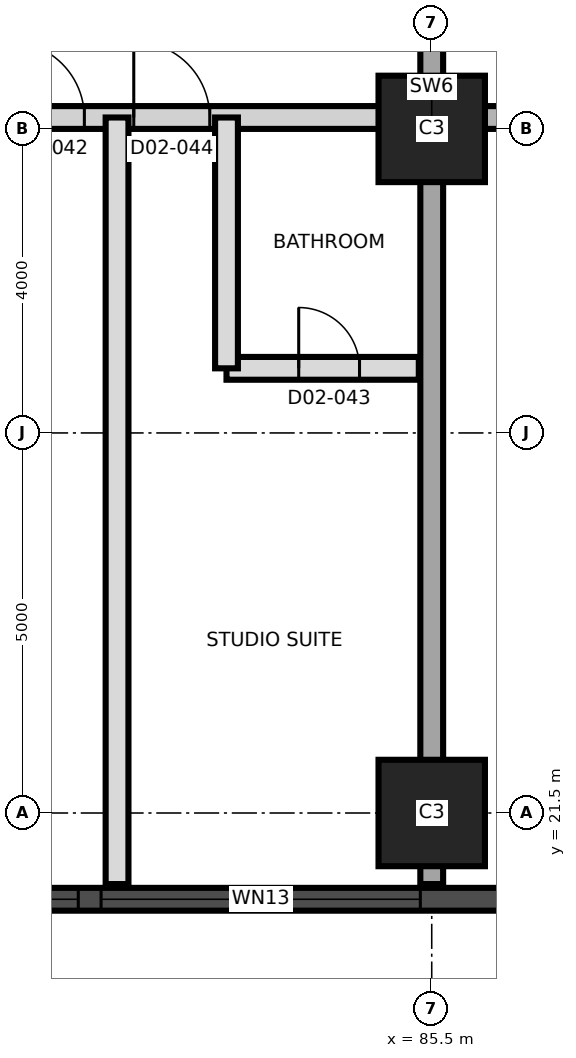
"""IFC4 building model, lengths in metres.
Left out: names, types, materials, properties, quantities, classifications, styles, units other than length and angle.
Written with IfcOpenShell. Run it as: python <this file> out.ifc"""

import sys

from ifc_helpers import new_model, si_unit, direction, frame, frame_2d, origin, origin_2d, place, context, subcontext, project, spatial, rectangle, extrude, element, fill, save


model = new_model("IFC4")
c1 = context("Model", 3, precision=1e-05, world=origin(), true_north=direction((0.0, 1.0)))
c2 = subcontext(c1, "Body", "Model", "MODEL_VIEW")
j1 = project(units=[si_unit("LENGTHUNIT", "METRE"), si_unit("PLANEANGLEUNIT", "RADIAN")], contexts=[c1])
p1 = place(None, origin())
s1 = spatial("IfcSite", under=j1, at=p1, CompositionType="ELEMENT")
p2 = place(p1, origin())
s2 = spatial("IfcBuilding", under=s1, at=p2, CompositionType="ELEMENT")
p3 = place(p2, frame((0.0, 0.0, 48.3)))
s3 = spatial("IfcBuildingStorey", under=s2, at=p3, CompositionType="ELEMENT", Elevation=48.3)
for number, where, z_axis, x_axis in (
    (1, (85.5, 21.5, 0.0), (0.0, 0.0, 1.0), (1.0, 0.0, 0.0)),
    (2, (85.5, 30.5, 0.0), (0.0, 0.0, 1.0), (1.0, 0.0, 0.0)),
):
    element("IfcColumn", number, at=place(p3, frame(where, z_axis=z_axis, x_axis=x_axis)), inside=s3, PredefinedType="COLUMN", context=c2, shape_type="SweptSolid", body=[
        extrude(rectangle(XDim=1.4, YDim=1.4, at=origin_2d()), origin(), (0.0, 0.0, 1.0), 3.7),
    ])
p4 = place(p3, frame((85.5, 20.565, 0.0), z_axis=(0.0, 0.0, 1.0), x_axis=(0.0, 1.0, 0.0)))
e3 = element("IfcWall", 3, at=p4, inside=s3, PredefinedType="SHEAR", context=c2, shape_type="SweptSolid", body=[
    extrude(rectangle(XDim=19.87, YDim=0.3, at=frame_2d((9.935, 0.0))), origin(), (0.0, 0.0, 1.0), 3.7),
])
p5 = place(p4, frame((11.135, 0.0, 0.0)))
e4 = element("IfcOpeningElement", 4, at=p5, cuts=e3, PredefinedType="OPENING", context=c2, shape_type="SweptSolid", body=[
    extrude(rectangle(XDim=1.4, YDim=2.1, at=frame_2d((0.7, 1.05))), frame((0.0, 0.16, 0.0), z_axis=(0.0, -1.0, 0.0), x_axis=(1.0, 0.0, 0.0)), (0.0, 0.0, 1.0), 0.32),
])
p6 = place(p3, frame((44.021, 20.365, 0.0), z_axis=(0.0, 0.0, 1.0), x_axis=(1.0, 0.0, 0.0)))
e5 = element("IfcWall", 5, at=p6, inside=s3, PredefinedType="SOLIDWALL", context=c2, shape_type="SweptSolid", body=[
    extrude(rectangle(XDim=43.466, YDim=0.3, at=frame_2d((21.733, 0.0))), origin(), (0.0, 0.0, 1.0), 3.4),
])
p7 = place(p6, frame((1.84, 0.0, 0.3)))
e6 = element("IfcOpeningElement", 6, at=p7, cuts=e5, PredefinedType="OPENING", context=c2, shape_type="SweptSolid", body=[
    extrude(rectangle(XDim=1.8, YDim=2.4, at=frame_2d((0.9, 1.2))), frame((0.0, 0.16, 0.0), z_axis=(0.0, -1.0, 0.0), x_axis=(1.0, 0.0, 0.0)), (0.0, 0.0, 1.0), 0.32),
])
p8 = place(p6, frame((5.63, 0.0, 0.9)))
e7 = element("IfcOpeningElement", 7, at=p8, cuts=e5, PredefinedType="OPENING", context=c2, shape_type="SweptSolid", body=[
    extrude(rectangle(XDim=4.2, YDim=1.7, at=frame_2d((2.1, 0.85))), frame((0.0, 0.16, 0.0), z_axis=(0.0, -1.0, 0.0), x_axis=(1.0, 0.0, 0.0)), (0.0, 0.0, 1.0), 0.32),
])
p9 = place(p6, frame((10.13, 0.0, 0.9)))
e8 = element("IfcOpeningElement", 8, at=p9, cuts=e5, PredefinedType="OPENING", context=c2, shape_type="SweptSolid", body=[
    extrude(rectangle(XDim=4.2, YDim=1.7, at=frame_2d((2.1, 0.85))), frame((0.0, 0.16, 0.0), z_axis=(0.0, -1.0, 0.0), x_axis=(1.0, 0.0, 0.0)), (0.0, 0.0, 1.0), 0.32),
])
p10 = place(p6, frame((14.63, 0.0, 0.9)))
e9 = element("IfcOpeningElement", 9, at=p10, cuts=e5, PredefinedType="OPENING", context=c2, shape_type="SweptSolid", body=[
    extrude(rectangle(XDim=4.2, YDim=1.7, at=frame_2d((2.1, 0.85))), frame((0.0, 0.16, 0.0), z_axis=(0.0, -1.0, 0.0), x_axis=(1.0, 0.0, 0.0)), (0.0, 0.0, 1.0), 0.32),
])
p11 = place(p6, frame((19.13, 0.0, 0.9)))
e10 = element("IfcOpeningElement", 10, at=p11, cuts=e5, PredefinedType="OPENING", context=c2, shape_type="SweptSolid", body=[
    extrude(rectangle(XDim=4.2, YDim=1.7, at=frame_2d((2.1, 0.85))), frame((0.0, 0.16, 0.0), z_axis=(0.0, -1.0, 0.0), x_axis=(1.0, 0.0, 0.0)), (0.0, 0.0, 1.0), 0.32),
])
p12 = place(p6, frame((23.63, 0.0, 0.9)))
e11 = element("IfcOpeningElement", 11, at=p12, cuts=e5, PredefinedType="OPENING", context=c2, shape_type="SweptSolid", body=[
    extrude(rectangle(XDim=4.2, YDim=1.7, at=frame_2d((2.1, 0.85))), frame((0.0, 0.16, 0.0), z_axis=(0.0, -1.0, 0.0), x_axis=(1.0, 0.0, 0.0)), (0.0, 0.0, 1.0), 0.32),
])
p13 = place(p6, frame((28.13, 0.0, 0.9)))
e12 = element("IfcOpeningElement", 12, at=p13, cuts=e5, PredefinedType="OPENING", context=c2, shape_type="SweptSolid", body=[
    extrude(rectangle(XDim=4.2, YDim=1.7, at=frame_2d((2.1, 0.85))), frame((0.0, 0.16, 0.0), z_axis=(0.0, -1.0, 0.0), x_axis=(1.0, 0.0, 0.0)), (0.0, 0.0, 1.0), 0.32),
])
p14 = place(p6, frame((32.63, 0.0, 0.9)))
e13 = element("IfcOpeningElement", 13, at=p14, cuts=e5, PredefinedType="OPENING", context=c2, shape_type="SweptSolid", body=[
    extrude(rectangle(XDim=4.2, YDim=1.7, at=frame_2d((2.1, 0.85))), frame((0.0, 0.16, 0.0), z_axis=(0.0, -1.0, 0.0), x_axis=(1.0, 0.0, 0.0)), (0.0, 0.0, 1.0), 0.32),
])
p15 = place(p6, frame((37.13, 0.0, 0.9)))
e14 = element("IfcOpeningElement", 14, at=p15, cuts=e5, PredefinedType="OPENING", context=c2, shape_type="SweptSolid", body=[
    extrude(rectangle(XDim=4.2, YDim=1.7, at=frame_2d((2.1, 0.85))), frame((0.0, 0.16, 0.0), z_axis=(0.0, -1.0, 0.0), x_axis=(1.0, 0.0, 0.0)), (0.0, 0.0, 1.0), 0.32),
])
p16 = place(p3, frame((82.8, 27.35, 0.0), z_axis=(0.0, 0.0, 1.0), x_axis=(1.0, 0.0, 0.0)))
e15 = element("IfcWall", 15, at=p16, inside=s3, PredefinedType="PARTITIONING", context=c2, shape_type="SweptSolid", body=[
    extrude(rectangle(XDim=2.53, YDim=0.3, at=frame_2d((1.265, 0.0))), origin(), (0.0, 0.0, 1.0), 3.4),
])
p17 = place(p16, frame((0.95, 0.0, 0.0)))
e16 = element("IfcOpeningElement", 16, at=p17, cuts=e15, PredefinedType="OPENING", context=c2, shape_type="SweptSolid", body=[
    extrude(rectangle(XDim=0.8, YDim=2.1, at=frame_2d((0.4, 1.05))), frame((0.0, 0.16, 0.0), z_axis=(0.0, -1.0, 0.0), x_axis=(1.0, 0.0, 0.0)), (0.0, 0.0, 1.0), 0.32),
])
p18 = place(p3, frame((58.95, 30.65, 0.0), z_axis=(0.0, 0.0, 1.0), x_axis=(1.0, 0.0, 0.0)))
e17 = element("IfcWall", 17, at=p18, inside=s3, PredefinedType="PARTITIONING", context=c2, shape_type="SweptSolid", body=[
    extrude(rectangle(XDim=26.38, YDim=0.3, at=frame_2d((13.19, 0.0))), origin(), (0.0, 0.0, 1.0), 3.4),
])
p19 = place(p18, frame((0.685, 0.0, 0.0)))
e18 = element("IfcOpeningElement", 18, at=p19, cuts=e17, PredefinedType="OPENING", context=c2, shape_type="SweptSolid", body=[
    extrude(rectangle(XDim=1.2, YDim=2.1, at=frame_2d((0.6, 1.05))), frame((0.0, 0.16, 0.0), z_axis=(0.0, -1.0, 0.0), x_axis=(1.0, 0.0, 0.0)), (0.0, 0.0, 1.0), 0.32),
])
p20 = place(p18, frame((3.935, 0.0, 0.0)))
e19 = element("IfcOpeningElement", 19, at=p20, cuts=e17, PredefinedType="OPENING", context=c2, shape_type="SweptSolid", body=[
    extrude(rectangle(XDim=1.0, YDim=2.1, at=frame_2d((0.5, 1.05))), frame((0.0, 0.16, 0.0), z_axis=(0.0, -1.0, 0.0), x_axis=(1.0, 0.0, 0.0)), (0.0, 0.0, 1.0), 0.32),
])
p21 = place(p18, frame((12.55, 0.0, 0.0)))
e20 = element("IfcOpeningElement", 20, at=p21, cuts=e17, PredefinedType="OPENING", context=c2, shape_type="SweptSolid", body=[
    extrude(rectangle(XDim=1.0, YDim=2.4, at=frame_2d((0.5, 1.2))), frame((0.0, 0.16, 0.0), z_axis=(0.0, -1.0, 0.0), x_axis=(1.0, 0.0, 0.0)), (0.0, 0.0, 1.0), 0.32),
])
p22 = place(p18, frame((20.98, 0.0, 0.0)))
e21 = element("IfcOpeningElement", 21, at=p22, cuts=e17, PredefinedType="OPENING", context=c2, shape_type="SweptSolid", body=[
    extrude(rectangle(XDim=1.0, YDim=2.4, at=frame_2d((0.5, 1.2))), frame((0.0, 0.16, 0.0), z_axis=(0.0, -1.0, 0.0), x_axis=(1.0, 0.0, 0.0)), (0.0, 0.0, 1.0), 0.32),
])
p23 = place(p18, frame((22.63, 0.0, 0.0)))
e22 = element("IfcOpeningElement", 22, at=p23, cuts=e17, PredefinedType="OPENING", context=c2, shape_type="SweptSolid", body=[
    extrude(rectangle(XDim=1.0, YDim=2.4, at=frame_2d((0.5, 1.2))), frame((0.0, 0.16, 0.0), z_axis=(0.0, -1.0, 0.0), x_axis=(1.0, 0.0, 0.0)), (0.0, 0.0, 1.0), 0.32),
])
p24 = place(p3, frame((85.67, 30.65, 0.0), z_axis=(0.0, 0.0, 1.0), x_axis=(1.0, 0.0, 0.0)))
e23 = element("IfcWall", 23, at=p24, inside=s3, PredefinedType="SHEAR", context=c2, shape_type="SweptSolid", body=[
    extrude(rectangle(XDim=9.58, YDim=0.3, at=frame_2d((4.79, 0.0))), origin(), (0.0, 0.0, 1.0), 3.4),
])
p25 = place(p24, frame((2.08, 0.0, 0.0)))
e24 = element("IfcOpeningElement", 24, at=p25, cuts=e23, PredefinedType="OPENING", context=c2, shape_type="SweptSolid", body=[
    extrude(rectangle(XDim=1.2, YDim=2.1, at=frame_2d((0.6, 1.05))), frame((0.0, 0.16, 0.0), z_axis=(0.0, -1.0, 0.0), x_axis=(1.0, 0.0, 0.0)), (0.0, 0.0, 1.0), 0.32),
])
p26 = place(p24, frame((5.63, 0.0, 0.0)))
e25 = element("IfcOpeningElement", 25, at=p26, cuts=e23, PredefinedType="OPENING", context=c2, shape_type="SweptSolid", body=[
    extrude(rectangle(XDim=1.0, YDim=2.1, at=frame_2d((0.5, 1.05))), frame((0.0, 0.16, 0.0), z_axis=(0.0, -1.0, 0.0), x_axis=(1.0, 0.0, 0.0)), (0.0, 0.0, 1.0), 0.32),
])
p27 = place(p3, frame((81.36, 20.565, 0.0), z_axis=(0.0, 0.0, 1.0), x_axis=(0.0, 1.0, 0.0)))
e26 = element("IfcWall", 26, at=p27, inside=s3, PredefinedType="PARTITIONING", context=c2, shape_type="SweptSolid", body=[
    extrude(rectangle(XDim=10.085, YDim=0.3, at=frame_2d((5.042, 0.0))), origin(), (0.0, 0.0, 1.0), 3.4),
])
p28 = place(p3, frame((82.8, 27.35, 0.0), z_axis=(0.0, 0.0, 1.0), x_axis=(0.0, 1.0, 0.0)))
e27 = element("IfcWall", 27, at=p28, inside=s3, PredefinedType="PARTITIONING", context=c2, shape_type="SweptSolid", body=[
    extrude(rectangle(XDim=3.3, YDim=0.3, at=frame_2d((1.65, 0.0))), origin(), (0.0, 0.0, 1.0), 3.4),
])
p29 = place(p14, origin())
e28 = element("IfcWindow", 28, at=p29, inside=s3, PartitioningType="SINGLE_PANEL", PredefinedType="WINDOW", context=c2, shape_type="SweptSolid", body=[
    extrude(rectangle(XDim=4.2, YDim=1.7, at=frame_2d((2.1, 0.85))), frame((0.0, 0.03, 0.0), z_axis=(0.0, -1.0, 0.0), x_axis=(1.0, 0.0, 0.0)), (0.0, 0.0, 1.0), 0.06),
])
fill(e13, e28)
p30 = place(p15, origin())
e29 = element("IfcWindow", 29, at=p30, inside=s3, PartitioningType="SINGLE_PANEL", PredefinedType="WINDOW", context=c2, shape_type="SweptSolid", body=[
    extrude(rectangle(XDim=4.2, YDim=1.7, at=frame_2d((2.1, 0.85))), frame((0.0, 0.03, 0.0), z_axis=(0.0, -1.0, 0.0), x_axis=(1.0, 0.0, 0.0)), (0.0, 0.0, 1.0), 0.06),
])
fill(e14, e29)
p31 = place(p22, origin())
e30 = element("IfcDoor", 30, at=p31, inside=s3, OperationType="SINGLE_SWING_LEFT", PredefinedType="DOOR", context=c2, shape_type="SweptSolid", body=[
    extrude(rectangle(XDim=1.0, YDim=2.4, at=frame_2d((0.5, 1.2))), frame((0.0, 0.025, 0.0), z_axis=(0.0, -1.0, 0.0), x_axis=(1.0, 0.0, 0.0)), (0.0, 0.0, 1.0), 0.05),
])
fill(e21, e30)
p32 = place(p17, origin())
e31 = element("IfcDoor", 31, at=p32, inside=s3, OperationType="SINGLE_SWING_LEFT", PredefinedType="DOOR", context=c2, shape_type="SweptSolid", body=[
    extrude(rectangle(XDim=0.8, YDim=2.1, at=frame_2d((0.4, 1.05))), frame((0.0, 0.025, 0.0), z_axis=(0.0, -1.0, 0.0), x_axis=(1.0, 0.0, 0.0)), (0.0, 0.0, 1.0), 0.05),
])
fill(e16, e31)
p33 = place(p23, origin())
e32 = element("IfcDoor", 32, at=p33, inside=s3, OperationType="SINGLE_SWING_RIGHT", PredefinedType="DOOR", context=c2, shape_type="SweptSolid", body=[
    extrude(rectangle(XDim=1.0, YDim=2.4, at=frame_2d((0.5, 1.2))), frame((0.0, 0.025, 0.0), z_axis=(0.0, -1.0, 0.0), x_axis=(1.0, 0.0, 0.0)), (0.0, 0.0, 1.0), 0.05),
])
fill(e22, e32)
save(model, sys.argv[1])
